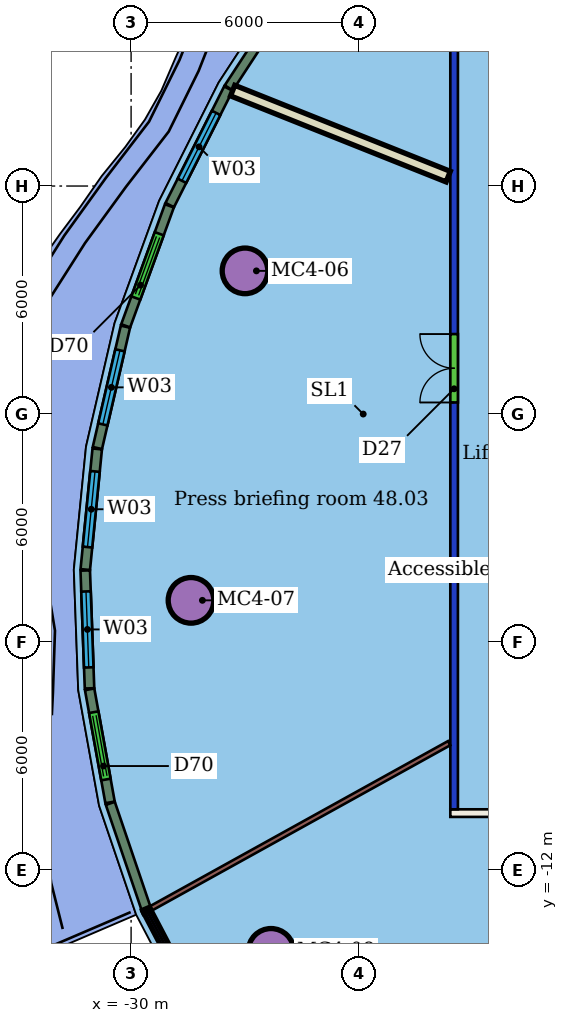
"""IFC4 building model, lengths in metres.
Left out: names, types, materials, properties, quantities, classifications, styles, units other than length and angle.
Written with IfcOpenShell. Run it as: python <this file> out.ifc"""

import sys

from ifc_helpers import new_model, si_unit, direction, frame, frame_2d, origin, origin_2d, place, context, subcontext, project, spatial, rectangle, hollow_circle, extrude, element, fill, save


model = new_model("IFC4")
c1 = context("Model", 3, precision=1e-05, world=origin(), true_north=direction((0.0, 1.0)))
c2 = subcontext(c1, "Body", "Model", "MODEL_VIEW")
j1 = project(units=[si_unit("LENGTHUNIT", "METRE"), si_unit("PLANEANGLEUNIT", "RADIAN")], contexts=[c1])
p1 = place(None, origin())
s1 = spatial("IfcSite", under=j1, at=p1, CompositionType="ELEMENT")
p2 = place(p1, origin())
s2 = spatial("IfcBuilding", under=s1, at=p2, CompositionType="ELEMENT")
p3 = place(p2, frame((0.0, 0.0, 199.3)))
s3 = spatial("IfcBuildingStorey", under=s2, at=p3, CompositionType="ELEMENT", Elevation=199.3)
for number, where, z_axis, x_axis in (
    (1, (-27.003, 3.768, 0.0), (0.0, 0.0, 1.0), (1.0, 0.0, 0.0)),
    (2, (-28.424, -4.901, 0.0), (0.0, 0.0, 1.0), (1.0, 0.0, 0.0)),
    (3, (-26.318, -14.137, 0.0), (0.0, 0.0, 1.0), (1.0, 0.0, 0.0)),
):
    element("IfcColumn", number, at=place(p3, frame(where, z_axis=z_axis, x_axis=x_axis)), inside=s3, PredefinedType="COLUMN", context=c2, shape_type="SweptSolid", body=[
        extrude(hollow_circle(Radius=0.6, WallThickness=0.045, at=origin_2d()), origin(), (0.0, 0.0, 1.0), 3.45),
    ])
p4 = place(p3, frame((9.6, -10.5, 0.0), z_axis=(0.0, 0.0, 1.0), x_axis=(-1.0, 0.0, 0.0)))
e4 = element("IfcWall", 4, at=p4, inside=s3, PredefinedType="PARTITIONING", context=c2, shape_type="SweptSolid", body=[
    extrude(rectangle(XDim=31.2, YDim=0.2, at=frame_2d((15.6, 0.0))), origin(), (0.0, 0.0, 1.0), 3.45),
])
p5 = place(p4, frame((22.137, 0.0, 0.0)))
e5 = element("IfcOpeningElement", 5, at=p5, cuts=e4, PredefinedType="OPENING", context=c2, shape_type="SweptSolid", body=[
    extrude(rectangle(XDim=1.8, YDim=2.1, at=frame_2d((0.9, 1.05))), frame((0.0, 0.11, 0.0), z_axis=(0.0, -1.0, 0.0), x_axis=(1.0, 0.0, 0.0)), (0.0, 0.0, 1.0), 0.22),
])
p6 = place(p4, frame((16.636, 0.0, 0.0)))
e6 = element("IfcOpeningElement", 6, at=p6, cuts=e4, PredefinedType="OPENING", context=c2, shape_type="SweptSolid", body=[
    extrude(rectangle(XDim=1.0, YDim=2.4, at=frame_2d((0.5, 1.2))), frame((0.0, 0.11, 0.0), z_axis=(0.0, -1.0, 0.0), x_axis=(1.0, 0.0, 0.0)), (0.0, 0.0, 1.0), 0.22),
])
p7 = place(p4, frame((8.655, 0.0, 0.0)))
e7 = element("IfcOpeningElement", 7, at=p7, cuts=e4, PredefinedType="OPENING", context=c2, shape_type="SweptSolid", body=[
    extrude(rectangle(XDim=1.0, YDim=2.4, at=frame_2d((0.5, 1.2))), frame((0.0, 0.11, 0.0), z_axis=(0.0, -1.0, 0.0), x_axis=(1.0, 0.0, 0.0)), (0.0, 0.0, 1.0), 0.22),
])
p8 = place(p3, frame((-21.5, -10.4, 0.0), z_axis=(0.0, 0.0, 1.0), x_axis=(0.0, 1.0, 0.0)))
e8 = element("IfcWall", 8, at=p8, inside=s3, PredefinedType="PARTITIONING", context=c2, shape_type="SweptSolid", body=[
    extrude(rectangle(XDim=20.8, YDim=0.2, at=frame_2d((10.4, 0.0))), origin(), (0.0, 0.0, 1.0), 3.05),
])
p9 = place(p8, frame((10.705, 0.0, 0.0)))
e9 = element("IfcOpeningElement", 9, at=p9, cuts=e8, PredefinedType="OPENING", context=c2, shape_type="SweptSolid", body=[
    extrude(rectangle(XDim=1.8, YDim=2.4, at=frame_2d((0.9, 1.2))), frame((0.0, 0.11, 0.0), z_axis=(0.0, -1.0, 0.0), x_axis=(1.0, 0.0, 0.0)), (0.0, 0.0, 1.0), 0.22),
])
p10 = place(p3, frame((-27.328, 8.511, 0.0), z_axis=(0.0, 0.0, 1.0), x_axis=(0.928768643744, -0.370659960608, 0.0)))
e10 = element("IfcWall", 10, at=p10, inside=s3, PredefinedType="PARTITIONING", context=c2, shape_type="SweptSolid", body=[
    extrude(rectangle(XDim=6.107, YDim=0.3, at=frame_2d((3.054, 0.0))), origin(), (0.0, 0.0, 1.0), 3.45),
])
p11 = place(p3, frame((-29.476, -13.006, 0.0), z_axis=(0.0, 0.0, 1.0), x_axis=(0.874733135583, 0.484604933439, 0.0)))
e11 = element("IfcWall", 11, at=p11, inside=s3, PredefinedType="PARTITIONING", context=c2, shape_type="SweptSolid", body=[
    extrude(rectangle(XDim=8.969, YDim=0.125, at=frame_2d((4.485, 0.0))), origin(), (0.0, 0.0, 1.0), 3.45),
])
p12 = place(p3, frame((-25.545, 11.466, 0.0), z_axis=(0.0, 0.0, 1.0), x_axis=(-0.547235995567, -0.836978354054, 0.0)))
e12 = element("IfcWall", 12, at=p12, inside=s3, PredefinedType="SOLIDWALL", context=c2, shape_type="SweptSolid", body=[
    extrude(rectangle(XDim=3.445, YDim=0.25, at=frame_2d((1.722, 0.0))), origin(), (0.0, 0.0, 1.0), 3.1),
])
p13 = place(p3, frame((-27.441, 8.564, 0.0), z_axis=(0.0, 0.0, 1.0), x_axis=(-0.449602668961, -0.89322866057, 0.0)))
e13 = element("IfcWall", 13, at=p13, inside=s3, PredefinedType="SOLIDWALL", context=c2, shape_type="SweptSolid", body=[
    extrude(rectangle(XDim=3.431, YDim=0.25, at=frame_2d((1.716, 0.0))), origin(), (0.0, 0.0, 1.0), 3.1),
])
p14 = place(p13, frame((0.716, 0.0, 0.9)))
e14 = element("IfcOpeningElement", 14, at=p14, cuts=e13, PredefinedType="OPENING", context=c2, shape_type="SweptSolid", body=[
    extrude(rectangle(XDim=2.0, YDim=2.1, at=frame_2d((1.0, 1.05))), frame((0.0, 0.135, 0.0), z_axis=(0.0, -1.0, 0.0), x_axis=(1.0, 0.0, 0.0)), (0.0, 0.0, 1.0), 0.27),
])
p15 = place(p3, frame((-28.992, 5.478, 0.0), z_axis=(0.0, 0.0, 1.0), x_axis=(-0.342379036898, -0.939561916583, 0.0)))
e15 = element("IfcWall", 15, at=p15, inside=s3, PredefinedType="SOLIDWALL", context=c2, shape_type="SweptSolid", body=[
    extrude(rectangle(XDim=3.359, YDim=0.25, at=frame_2d((1.68, 0.0))), origin(), (0.0, 0.0, 1.0), 3.1),
])
p16 = place(p15, frame((0.78, 0.0, 0.0)))
e16 = element("IfcOpeningElement", 16, at=p16, cuts=e15, PredefinedType="OPENING", context=c2, shape_type="SweptSolid", body=[
    extrude(rectangle(XDim=1.8, YDim=2.4, at=frame_2d((0.9, 1.2))), frame((0.0, 0.135, 0.0), z_axis=(0.0, -1.0, 0.0), x_axis=(1.0, 0.0, 0.0)), (0.0, 0.0, 1.0), 0.27),
])
p17 = place(p3, frame((-30.149, 2.3, 0.0), z_axis=(0.0, 0.0, 1.0), x_axis=(-0.225196810923, -0.974313294762, 0.0)))
e17 = element("IfcWall", 17, at=p17, inside=s3, PredefinedType="SOLIDWALL", context=c2, shape_type="SweptSolid", body=[
    extrude(rectangle(XDim=3.277, YDim=0.25, at=frame_2d((1.639, 0.0))), origin(), (0.0, 0.0, 1.0), 3.1),
])
p18 = place(p17, frame((0.639, 0.0, 0.9)))
e18 = element("IfcOpeningElement", 18, at=p18, cuts=e17, PredefinedType="OPENING", context=c2, shape_type="SweptSolid", body=[
    extrude(rectangle(XDim=2.0, YDim=2.1, at=frame_2d((1.0, 1.05))), frame((0.0, 0.135, 0.0), z_axis=(0.0, -1.0, 0.0), x_axis=(1.0, 0.0, 0.0)), (0.0, 0.0, 1.0), 0.27),
])
p19 = place(p3, frame((-30.891, -0.917, 0.0), z_axis=(0.0, 0.0, 1.0), x_axis=(-0.09873075653, -0.995114183255, 0.0)))
e19 = element("IfcWall", 19, at=p19, inside=s3, PredefinedType="SOLIDWALL", context=c2, shape_type="SweptSolid", body=[
    extrude(rectangle(XDim=3.19, YDim=0.25, at=frame_2d((1.595, 0.0))), origin(), (0.0, 0.0, 1.0), 3.1),
])
p20 = place(p19, frame((0.595, 0.0, 0.9)))
e20 = element("IfcOpeningElement", 20, at=p20, cuts=e19, PredefinedType="OPENING", context=c2, shape_type="SweptSolid", body=[
    extrude(rectangle(XDim=2.0, YDim=2.1, at=frame_2d((1.0, 1.05))), frame((0.0, 0.135, 0.0), z_axis=(0.0, -1.0, 0.0), x_axis=(1.0, 0.0, 0.0)), (0.0, 0.0, 1.0), 0.27),
])
p21 = place(p3, frame((-31.207, -4.116, 0.0), z_axis=(0.0, 0.0, 1.0), x_axis=(0.036429625248, -0.999336220901, 0.0)))
e21 = element("IfcWall", 21, at=p21, inside=s3, PredefinedType="SOLIDWALL", context=c2, shape_type="SweptSolid", body=[
    extrude(rectangle(XDim=3.103, YDim=0.25, at=frame_2d((1.551, 0.0))), origin(), (0.0, 0.0, 1.0), 3.1),
])
p22 = place(p21, frame((0.552, 0.0, 0.9)))
e22 = element("IfcOpeningElement", 22, at=p22, cuts=e21, PredefinedType="OPENING", context=c2, shape_type="SweptSolid", body=[
    extrude(rectangle(XDim=2.0, YDim=2.1, at=frame_2d((1.0, 1.05))), frame((0.0, 0.135, 0.0), z_axis=(0.0, -1.0, 0.0), x_axis=(1.0, 0.0, 0.0)), (0.0, 0.0, 1.0), 0.27),
])
p23 = place(p3, frame((-31.091, -7.243, 0.0), z_axis=(0.0, 0.0, 1.0), x_axis=(0.177755310082, -0.984074717558, 0.0)))
e23 = element("IfcWall", 23, at=p23, inside=s3, PredefinedType="SOLIDWALL", context=c2, shape_type="SweptSolid", body=[
    extrude(rectangle(XDim=3.023, YDim=0.25, at=frame_2d((1.511, 0.0))), origin(), (0.0, 0.0, 1.0), 3.1),
])
p24 = place(p23, frame((0.611, 0.0, 0.0)))
e24 = element("IfcOpeningElement", 24, at=p24, cuts=e23, PredefinedType="OPENING", context=c2, shape_type="SweptSolid", body=[
    extrude(rectangle(XDim=1.8, YDim=2.4, at=frame_2d((0.9, 1.2))), frame((0.0, 0.135, 0.0), z_axis=(0.0, -1.0, 0.0), x_axis=(1.0, 0.0, 0.0)), (0.0, 0.0, 1.0), 0.27),
])
p25 = place(p3, frame((-30.547, -10.243, 0.0), z_axis=(0.0, 0.0, 1.0), x_axis=(0.321901231571, -0.946773255385, 0.0)))
e25 = element("IfcWall", 25, at=p25, inside=s3, PredefinedType="SOLIDWALL", context=c2, shape_type="SweptSolid", body=[
    extrude(rectangle(XDim=2.915, YDim=0.25, at=frame_2d((1.457, 0.0))), origin(), (0.0, 0.0, 1.0), 3.1),
])
p26 = place(p9, origin())
e26 = element("IfcDoor", 26, at=p26, inside=s3, OperationType="DOUBLE_DOOR_SINGLE_SWING", PredefinedType="DOOR", context=c2, shape_type="SweptSolid", body=[
    extrude(rectangle(XDim=1.8, YDim=2.4, at=frame_2d((0.9, 1.2))), frame((0.0, 0.025, 0.0), z_axis=(0.0, -1.0, 0.0), x_axis=(1.0, 0.0, 0.0)), (0.0, 0.0, 1.0), 0.05),
])
fill(e9, e26)
p27 = place(p14, origin())
e27 = element("IfcWindow", 27, at=p27, inside=s3, PartitioningType="SINGLE_PANEL", PredefinedType="WINDOW", context=c2, shape_type="SweptSolid", body=[
    extrude(rectangle(XDim=2.0, YDim=2.1, at=frame_2d((1.0, 1.05))), frame((0.0, 0.03, 0.0), z_axis=(0.0, -1.0, 0.0), x_axis=(1.0, 0.0, 0.0)), (0.0, 0.0, 1.0), 0.06),
])
fill(e14, e27)
p28 = place(p16, origin())
e28 = element("IfcDoor", 28, at=p28, inside=s3, OperationType="DOUBLE_DOOR_SLIDING", PredefinedType="DOOR", context=c2, shape_type="SweptSolid", body=[
    extrude(rectangle(XDim=1.8, YDim=2.4, at=frame_2d((0.9, 1.2))), frame((0.0, 0.025, 0.0), z_axis=(0.0, -1.0, 0.0), x_axis=(1.0, 0.0, 0.0)), (0.0, 0.0, 1.0), 0.05),
])
fill(e16, e28)
p29 = place(p18, origin())
e29 = element("IfcWindow", 29, at=p29, inside=s3, PartitioningType="SINGLE_PANEL", PredefinedType="WINDOW", context=c2, shape_type="SweptSolid", body=[
    extrude(rectangle(XDim=2.0, YDim=2.1, at=frame_2d((1.0, 1.05))), frame((0.0, 0.03, 0.0), z_axis=(0.0, -1.0, 0.0), x_axis=(1.0, 0.0, 0.0)), (0.0, 0.0, 1.0), 0.06),
])
fill(e18, e29)
p30 = place(p20, origin())
e30 = element("IfcWindow", 30, at=p30, inside=s3, PartitioningType="SINGLE_PANEL", PredefinedType="WINDOW", context=c2, shape_type="SweptSolid", body=[
    extrude(rectangle(XDim=2.0, YDim=2.1, at=frame_2d((1.0, 1.05))), frame((0.0, 0.03, 0.0), z_axis=(0.0, -1.0, 0.0), x_axis=(1.0, 0.0, 0.0)), (0.0, 0.0, 1.0), 0.06),
])
fill(e20, e30)
p31 = place(p22, origin())
e31 = element("IfcWindow", 31, at=p31, inside=s3, PartitioningType="SINGLE_PANEL", PredefinedType="WINDOW", context=c2, shape_type="SweptSolid", body=[
    extrude(rectangle(XDim=2.0, YDim=2.1, at=frame_2d((1.0, 1.05))), frame((0.0, 0.03, 0.0), z_axis=(0.0, -1.0, 0.0), x_axis=(1.0, 0.0, 0.0)), (0.0, 0.0, 1.0), 0.06),
])
fill(e22, e31)
p32 = place(p24, origin())
e32 = element("IfcDoor", 32, at=p32, inside=s3, OperationType="DOUBLE_DOOR_SLIDING", PredefinedType="DOOR", context=c2, shape_type="SweptSolid", body=[
    extrude(rectangle(XDim=1.8, YDim=2.4, at=frame_2d((0.9, 1.2))), frame((0.0, 0.025, 0.0), z_axis=(0.0, -1.0, 0.0), x_axis=(1.0, 0.0, 0.0)), (0.0, 0.0, 1.0), 0.05),
])
fill(e24, e32)
save(model, sys.argv[1])
